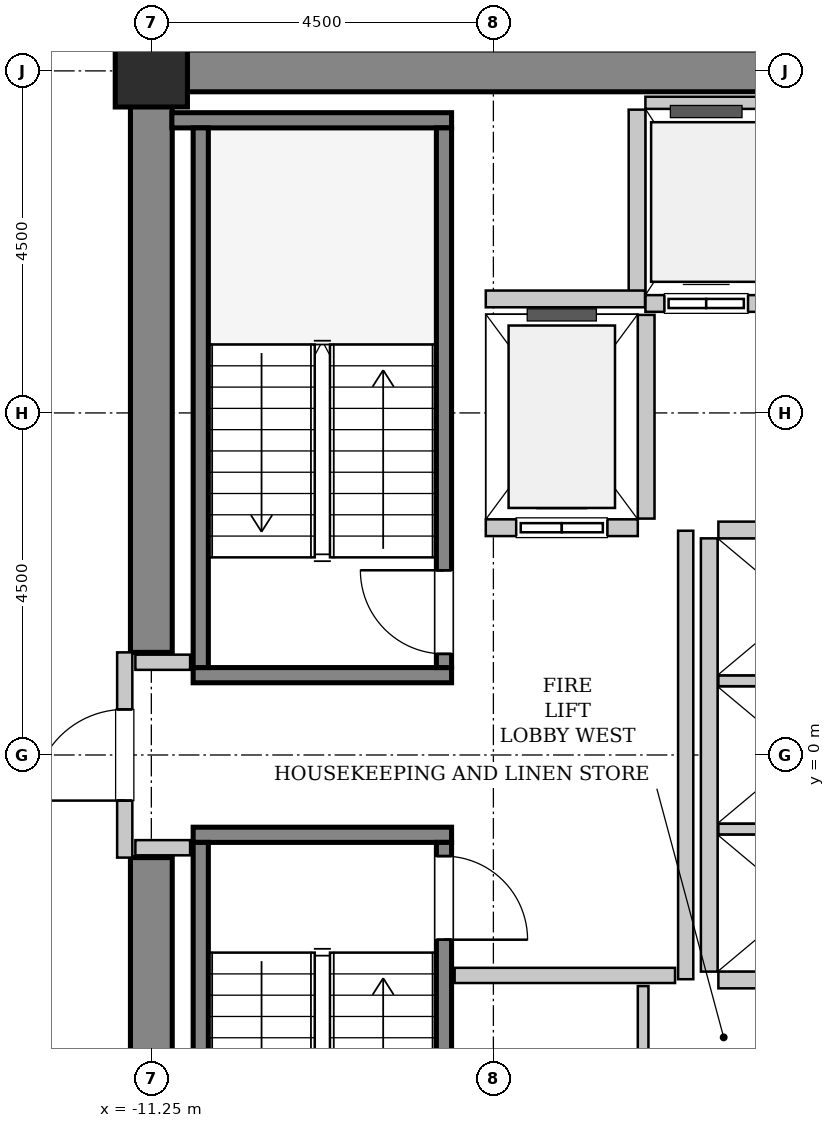
"""IFC4 building model, lengths in metres.
Left out: names, types, materials, properties, quantities, classifications, styles, units other than length and angle.
Written with IfcOpenShell. Run it as: python <this file> out.ifc"""

import sys

from ifc_helpers import new_model, si_unit, direction, frame, frame_2d, origin, origin_2d, place, context, subcontext, project, spatial, rectangle, hollow_rectangle, extrude, source, transform, mapped, element, fill, save


model = new_model("IFC4")
c1 = context("Model", 3, precision=1e-05, world=origin(), true_north=direction((0.0, 1.0)))
c2 = subcontext(c1, "Body", "Model", "MODEL_VIEW")
j1 = project(units=[si_unit("LENGTHUNIT", "METRE"), si_unit("PLANEANGLEUNIT", "RADIAN")], contexts=[c1])
p1 = place(None, origin())
s1 = spatial("IfcSite", under=j1, at=p1, CompositionType="ELEMENT")
p2 = place(p1, origin())
s2 = spatial("IfcBuilding", under=s1, at=p2, CompositionType="ELEMENT")
p3 = place(p2, frame((0.0, 0.0, 140.2)))
s3 = spatial("IfcBuildingStorey", under=s2, at=p3, CompositionType="ELEMENT", Elevation=140.2)
m1 = source(origin(), c2, "Body", "SweptSolid", [
    extrude(rectangle(XDim=9.975, YDim=0.55, at=frame_2d((4.987, 0.0))), origin(), (0.0, 0.0, 1.0), 3.8),
])
p4 = place(p3, frame((-11.525, 9.0, 0.0), z_axis=(0.0, 0.0, 1.0), x_axis=(1.0, 0.0, 0.0)))
e1 = element("IfcWall", 1, at=p4, inside=s3, PredefinedType="SHEAR", context=c2, shape_type="MappedRepresentation", body=[
    mapped(m1, transform((0.0, 0.0, 0.0), x_axis=(1.0, 0.0, 0.0), y_axis=(0.0, 1.0, 0.0), z_axis=(0.0, 0.0, 1.0), scale=1.0)),
])
m2 = source(origin(), c2, "Body", "SweptSolid", [
    extrude(rectangle(XDim=7.375, YDim=0.55, at=frame_2d((3.688, 0.0))), origin(), (0.0, 0.0, 1.0), 3.8),
])
for number, where, z_axis, x_axis in (
    (2, (-11.25, -8.725, 0.0), (0.0, 0.0, 1.0), (0.0, 1.0, 0.0)),
    (3, (-11.25, 1.35, 0.0), (0.0, 0.0, 1.0), (0.0, 1.0, 0.0)),
):
    element("IfcWall", number, at=place(p3, frame(where, z_axis=z_axis, x_axis=x_axis)), inside=s3, PredefinedType="SHEAR", context=c2, shape_type="MappedRepresentation", body=[
        mapped(m2, transform((0.0, 0.0, 0.0), x_axis=(1.0, 0.0, 0.0), y_axis=(0.0, 1.0, 0.0), z_axis=(0.0, 0.0, 1.0), scale=1.0)),
    ])
m3 = source(origin(), c2, "Body", "SweptSolid", [
    extrude(hollow_rectangle(XDim=0.95, YDim=0.95, WallThickness=0.045, InnerFilletRadius=0.045, OuterFilletRadius=0.09, at=origin_2d()), origin(), (0.0, 0.0, 1.0), 3.8),
])
p5 = place(p3, frame((-11.25, 9.0, 0.0), z_axis=(0.0, 0.0, 1.0), x_axis=(1.0, 0.0, 0.0)))
e4 = element("IfcColumn", 4, at=p5, inside=s3, PredefinedType="COLUMN", context=c2, shape_type="MappedRepresentation", body=[
    mapped(m3, transform((0.0, 0.0, 0.0), x_axis=(1.0, 0.0, 0.0), y_axis=(0.0, 1.0, 0.0), z_axis=(0.0, 0.0, 1.0), scale=1.0)),
])
m4 = source(origin(), c2, "Body", "SweptSolid", [
    extrude(rectangle(XDim=3.4, YDim=0.2, at=frame_2d((1.7, 0.0))), origin(), (0.0, 0.0, 1.0), 3.8),
])
p6 = place(p3, frame((-7.3, 1.05, 0.0), z_axis=(0.0, 0.0, 1.0), x_axis=(-1.0, 0.0, 0.0)))
e5 = element("IfcWall", 5, at=p6, inside=s3, PredefinedType="SOLIDWALL", context=c2, shape_type="MappedRepresentation", body=[
    mapped(m4, transform((0.0, 0.0, 0.0), x_axis=(1.0, 0.0, 0.0), y_axis=(0.0, 1.0, 0.0), z_axis=(0.0, 0.0, 1.0), scale=1.0)),
])
m5 = source(origin(), c2, "Body", "SweptSolid", [
    extrude(rectangle(XDim=3.68, YDim=0.2, at=frame_2d((1.84, 0.0))), origin(), (0.0, 0.0, 1.0), 3.8),
])
p7 = place(p3, frame((-7.3, 8.35, 0.0), z_axis=(0.0, 0.0, 1.0), x_axis=(-1.0, 0.0, 0.0)))
e6 = element("IfcWall", 6, at=p7, inside=s3, PredefinedType="SOLIDWALL", context=c2, shape_type="MappedRepresentation", body=[
    mapped(m5, transform((0.0, 0.0, 0.0), x_axis=(1.0, 0.0, 0.0), y_axis=(0.0, 1.0, 0.0), z_axis=(0.0, 0.0, 1.0), scale=1.0)),
])
m6 = source(origin(), c2, "Body", "SweptSolid", [
    extrude(rectangle(XDim=7.1, YDim=0.2, at=frame_2d((3.55, 0.0))), origin(), (0.0, 0.0, 1.0), 3.8),
])
p8 = place(p3, frame((-7.4, 1.15, 0.0), z_axis=(0.0, 0.0, 1.0), x_axis=(0.0, 1.0, 0.0)))
e7 = element("IfcWall", 7, at=p8, inside=s3, PredefinedType="SOLIDWALL", context=c2, shape_type="MappedRepresentation", body=[
    mapped(m6, transform((0.0, 0.0, 0.0), x_axis=(1.0, 0.0, 0.0), y_axis=(0.0, 1.0, 0.0), z_axis=(0.0, 0.0, 1.0), scale=1.0)),
])
p9 = place(p8, frame((0.18, 0.0, 0.0)))
e8 = element("IfcOpeningElement", 8, at=p9, cuts=e7, PredefinedType="OPENING", context=c2, shape_type="SweptSolid", body=[
    extrude(rectangle(XDim=1.1, YDim=2.15, at=frame_2d((0.55, 1.075))), frame((0.0, 0.11, 0.0), z_axis=(0.0, -1.0, 0.0), x_axis=(1.0, 0.0, 0.0)), (0.0, 0.0, 1.0), 0.22),
])
p10 = place(p3, frame((-10.6, 1.15, 0.0), z_axis=(0.0, 0.0, 1.0), x_axis=(0.0, 1.0, 0.0)))
e9 = element("IfcWall", 9, at=p10, inside=s3, PredefinedType="SOLIDWALL", context=c2, shape_type="MappedRepresentation", body=[
    mapped(m6, transform((0.0, 0.0, 0.0), x_axis=(1.0, 0.0, 0.0), y_axis=(0.0, 1.0, 0.0), z_axis=(0.0, 0.0, 1.0), scale=1.0)),
])
p11 = place(p3, frame((-10.7, -1.05, 0.0), z_axis=(0.0, 0.0, 1.0), x_axis=(1.0, 0.0, 0.0)))
e10 = element("IfcWall", 10, at=p11, inside=s3, PredefinedType="SOLIDWALL", context=c2, shape_type="MappedRepresentation", body=[
    mapped(m4, transform((0.0, 0.0, 0.0), x_axis=(1.0, 0.0, 0.0), y_axis=(0.0, 1.0, 0.0), z_axis=(0.0, 0.0, 1.0), scale=1.0)),
])
p12 = place(p3, frame((-10.6, -1.15, 0.0), z_axis=(0.0, 0.0, 1.0), x_axis=(0.0, -1.0, 0.0)))
e11 = element("IfcWall", 11, at=p12, inside=s3, PredefinedType="SOLIDWALL", context=c2, shape_type="MappedRepresentation", body=[
    mapped(m6, transform((0.0, 0.0, 0.0), x_axis=(1.0, 0.0, 0.0), y_axis=(0.0, 1.0, 0.0), z_axis=(0.0, 0.0, 1.0), scale=1.0)),
])
p13 = place(p3, frame((-7.4, -1.15, 0.0), z_axis=(0.0, 0.0, 1.0), x_axis=(0.0, -1.0, 0.0)))
e12 = element("IfcWall", 12, at=p13, inside=s3, PredefinedType="SOLIDWALL", context=c2, shape_type="MappedRepresentation", body=[
    mapped(m6, transform((0.0, 0.0, 0.0), x_axis=(1.0, 0.0, 0.0), y_axis=(0.0, 1.0, 0.0), z_axis=(0.0, 0.0, 1.0), scale=1.0)),
])
p14 = place(p13, frame((0.18, 0.0, 0.0)))
e13 = element("IfcOpeningElement", 13, at=p14, cuts=e12, PredefinedType="OPENING", context=c2, shape_type="SweptSolid", body=[
    extrude(rectangle(XDim=1.1, YDim=2.15, at=frame_2d((0.55, 1.075))), frame((0.0, 0.11, 0.0), z_axis=(0.0, -1.0, 0.0), x_axis=(1.0, 0.0, 0.0)), (0.0, 0.0, 1.0), 0.22),
])
m7 = source(origin(), c2, "Body", "SweptSolid", [
    extrude(rectangle(XDim=2.0, YDim=0.22, at=frame_2d((1.0, 0.0))), origin(), (0.0, 0.0, 1.0), 3.485),
])
p15 = place(p3, frame((-6.85, 2.99, 0.0), z_axis=(0.0, 0.0, 1.0), x_axis=(1.0, 0.0, 0.0)))
e14 = element("IfcWall", 14, at=p15, inside=s3, PredefinedType="SOLIDWALL", context=c2, shape_type="MappedRepresentation", body=[
    mapped(m7, transform((0.0, 0.0, 0.0), x_axis=(1.0, 0.0, 0.0), y_axis=(0.0, 1.0, 0.0), z_axis=(0.0, 0.0, 1.0), scale=1.0)),
])
p16 = place(p15, frame((0.4, 0.0, 0.0)))
e15 = element("IfcOpeningElement", 15, at=p16, cuts=e14, PredefinedType="OPENING", context=c2, shape_type="SweptSolid", body=[
    extrude(rectangle(XDim=1.2, YDim=2.2, at=frame_2d((0.6, 1.1))), frame((0.0, 0.12, 0.0), z_axis=(0.0, -1.0, 0.0), x_axis=(1.0, 0.0, 0.0)), (0.0, 0.0, 1.0), 0.24),
])
m8 = source(origin(), c2, "Body", "SweptSolid", [
    extrude(rectangle(XDim=2.68, YDim=0.22, at=frame_2d((1.34, 0.0))), origin(), (0.0, 0.0, 1.0), 3.485),
])
p17 = place(p3, frame((-4.74, 3.11, 0.0), z_axis=(0.0, 0.0, 1.0), x_axis=(0.0, 1.0, 0.0)))
e16 = element("IfcWall", 16, at=p17, inside=s3, PredefinedType="SOLIDWALL", context=c2, shape_type="MappedRepresentation", body=[
    mapped(m8, transform((0.0, 0.0, 0.0), x_axis=(1.0, 0.0, 0.0), y_axis=(0.0, 1.0, 0.0), z_axis=(0.0, 0.0, 1.0), scale=1.0)),
])
m9 = source(origin(), c2, "Body", "SweptSolid", [
    extrude(rectangle(XDim=3.2, YDim=0.22, at=frame_2d((1.6, 0.0))), origin(), (0.0, 0.0, 1.0), 3.485),
])
p18 = place(p3, frame((-4.75, 5.94, 0.0), z_axis=(0.0, 0.0, 1.0), x_axis=(1.0, 0.0, 0.0)))
e17 = element("IfcWall", 17, at=p18, inside=s3, PredefinedType="SOLIDWALL", context=c2, shape_type="MappedRepresentation", body=[
    mapped(m9, transform((0.0, 0.0, 0.0), x_axis=(1.0, 0.0, 0.0), y_axis=(0.0, 1.0, 0.0), z_axis=(0.0, 0.0, 1.0), scale=1.0)),
])
p19 = place(p18, frame((0.25, 0.0, 0.0)))
e18 = element("IfcOpeningElement", 18, at=p19, cuts=e17, PredefinedType="OPENING", context=c2, shape_type="SweptSolid", body=[
    extrude(rectangle(XDim=1.1, YDim=2.2, at=frame_2d((0.55, 1.1))), frame((0.0, 0.12, 0.0), z_axis=(0.0, -1.0, 0.0), x_axis=(1.0, 0.0, 0.0)), (0.0, 0.0, 1.0), 0.24),
])
p20 = place(p18, frame((1.875, 0.0, 0.0)))
e19 = element("IfcOpeningElement", 19, at=p20, cuts=e17, PredefinedType="OPENING", context=c2, shape_type="SweptSolid", body=[
    extrude(rectangle(XDim=1.1, YDim=2.2, at=frame_2d((0.55, 1.1))), frame((0.0, 0.12, 0.0), z_axis=(0.0, -1.0, 0.0), x_axis=(1.0, 0.0, 0.0)), (0.0, 0.0, 1.0), 0.24),
])
m10 = source(origin(), c2, "Body", "SweptSolid", [
    extrude(rectangle(XDim=3.2, YDim=0.16, at=frame_2d((1.6, 0.0))), origin(), (0.0, 0.0, 1.0), 2.375),
])
p21 = place(p3, frame((-1.55, 8.58, 0.0), z_axis=(0.0, 0.0, 1.0), x_axis=(-1.0, 0.0, 0.0)))
e20 = element("IfcWall", 20, at=p21, inside=s3, PredefinedType="PARTITIONING", context=c2, shape_type="MappedRepresentation", body=[
    mapped(m10, transform((0.0, 0.0, 0.0), x_axis=(1.0, 0.0, 0.0), y_axis=(0.0, 1.0, 0.0), z_axis=(0.0, 0.0, 1.0), scale=1.0)),
])
m11 = source(origin(), c2, "Body", "SweptSolid", [
    extrude(rectangle(XDim=2.43, YDim=0.22, at=frame_2d((1.215, 0.0))), origin(), (0.0, 0.0, 1.0), 3.485),
])
p22 = place(p3, frame((-4.86, 8.49, 0.0), z_axis=(0.0, 0.0, 1.0), x_axis=(0.0, -1.0, 0.0)))
e21 = element("IfcWall", 21, at=p22, inside=s3, PredefinedType="SOLIDWALL", context=c2, shape_type="MappedRepresentation", body=[
    mapped(m11, transform((0.0, 0.0, 0.0), x_axis=(1.0, 0.0, 0.0), y_axis=(0.0, 1.0, 0.0), z_axis=(0.0, 0.0, 1.0), scale=1.0)),
])
m12 = source(origin(), c2, "Body", "SweptSolid", [
    extrude(rectangle(XDim=5.7, YDim=0.22, at=frame_2d((2.85, 0.0))), origin(), (0.0, 0.0, 1.0), 3.485),
])
p23 = place(p3, frame((-3.91, 2.85, 0.0), z_axis=(0.0, 0.0, 1.0), x_axis=(0.0, -1.0, 0.0)))
e22 = element("IfcWall", 22, at=p23, inside=s3, PredefinedType="SOLIDWALL", context=c2, shape_type="MappedRepresentation", body=[
    mapped(m12, transform((0.0, 0.0, 0.0), x_axis=(1.0, 0.0, 0.0), y_axis=(0.0, 1.0, 0.0), z_axis=(0.0, 0.0, 1.0), scale=1.0)),
])
m13 = source(origin(), c2, "Body", "SweptSolid", [
    extrude(rectangle(XDim=2.13, YDim=0.22, at=frame_2d((1.065, 0.0))), origin(), (0.0, 0.0, 1.0), 3.485),
])
p24 = place(p3, frame((-3.79, -2.96, 0.0), z_axis=(0.0, 0.0, 1.0), x_axis=(1.0, 0.0, 0.0)))
e23 = element("IfcWall", 23, at=p24, inside=s3, PredefinedType="SOLIDWALL", context=c2, shape_type="MappedRepresentation", body=[
    mapped(m13, transform((0.0, 0.0, 0.0), x_axis=(1.0, 0.0, 0.0), y_axis=(0.0, 1.0, 0.0), z_axis=(0.0, 0.0, 1.0), scale=1.0)),
])
m14 = source(origin(), c2, "Body", "SweptSolid", [
    extrude(rectangle(XDim=2.13, YDim=0.14, at=frame_2d((1.065, 0.0))), origin(), (0.0, 0.0, 1.0), 3.485),
])
for number, where, z_axis, x_axis in (
    (24, (-3.79, -0.975, 0.0), (0.0, 0.0, 1.0), (1.0, 0.0, 0.0)),
    (25, (-3.79, 0.975, 0.0), (0.0, 0.0, 1.0), (1.0, 0.0, 0.0)),
):
    element("IfcWall", number, at=place(p3, frame(where, z_axis=z_axis, x_axis=x_axis)), inside=s3, PredefinedType="PARTITIONING", context=c2, shape_type="MappedRepresentation", body=[
        mapped(m14, transform((0.0, 0.0, 0.0), x_axis=(1.0, 0.0, 0.0), y_axis=(0.0, 1.0, 0.0), z_axis=(0.0, 0.0, 1.0), scale=1.0)),
    ])
p25 = place(p3, frame((-1.66, 2.96, 0.0), z_axis=(0.0, 0.0, 1.0), x_axis=(-1.0, 0.0, 0.0)))
e26 = element("IfcWall", 26, at=p25, inside=s3, PredefinedType="SOLIDWALL", context=c2, shape_type="MappedRepresentation", body=[
    mapped(m13, transform((0.0, 0.0, 0.0), x_axis=(1.0, 0.0, 0.0), y_axis=(0.0, 1.0, 0.0), z_axis=(0.0, 0.0, 1.0), scale=1.0)),
])
m15 = source(origin(), c2, "Body", "SweptSolid", [
    extrude(rectangle(XDim=2.095, YDim=0.22, at=frame_2d((1.048, 0.0))), origin(), (0.0, 0.0, 1.0), 3.485),
])
p26 = place(p3, frame((-6.85, 6.0, 0.0), z_axis=(0.0, 0.0, 1.0), x_axis=(1.0, 0.0, 0.0)))
e27 = element("IfcWall", 27, at=p26, inside=s3, PredefinedType="SOLIDWALL", context=c2, shape_type="MappedRepresentation", body=[
    mapped(m15, transform((0.0, 0.0, 0.0), x_axis=(1.0, 0.0, 0.0), y_axis=(0.0, 1.0, 0.0), z_axis=(0.0, 0.0, 1.0), scale=1.0)),
])
m16 = source(origin(), c2, "Body", "SweptSolid", [
    extrude(rectangle(XDim=2.7, YDim=0.2, at=frame_2d((1.35, 0.0))), origin(), (0.0, 0.0, 1.0), 2.375),
])
p27 = place(p3, frame((-11.6, -1.35, 0.0), z_axis=(0.0, 0.0, 1.0), x_axis=(0.0, 1.0, 0.0)))
e28 = element("IfcWall", 28, at=p27, inside=s3, PredefinedType="PARTITIONING", context=c2, shape_type="MappedRepresentation", body=[
    mapped(m16, transform((0.0, 0.0, 0.0), x_axis=(1.0, 0.0, 0.0), y_axis=(0.0, 1.0, 0.0), z_axis=(0.0, 0.0, 1.0), scale=1.0)),
])
p28 = place(p27, frame((0.75, 0.0, 0.0)))
e29 = element("IfcOpeningElement", 29, at=p28, cuts=e28, PredefinedType="OPENING", context=c2, shape_type="SweptSolid", body=[
    extrude(rectangle(XDim=1.2, YDim=2.15, at=frame_2d((0.6, 1.075))), frame((0.0, 0.11, 0.0), z_axis=(0.0, -1.0, 0.0), x_axis=(1.0, 0.0, 0.0)), (0.0, 0.0, 1.0), 0.22),
])
m17 = source(origin(), c2, "Body", "SweptSolid", [
    extrude(rectangle(XDim=5.9, YDim=0.2, at=frame_2d((2.95, 0.0))), origin(), (0.0, 0.0, 1.0), 3.485),
])
p29 = place(p3, frame((-4.22, -2.95, 0.0), z_axis=(0.0, 0.0, 1.0), x_axis=(0.0, 1.0, 0.0)))
e30 = element("IfcWall", 30, at=p29, inside=s3, PredefinedType="PARTITIONING", context=c2, shape_type="MappedRepresentation", body=[
    mapped(m17, transform((0.0, 0.0, 0.0), x_axis=(1.0, 0.0, 0.0), y_axis=(0.0, 1.0, 0.0), z_axis=(0.0, 0.0, 1.0), scale=1.0)),
])
m18 = source(origin(), c2, "Body", "SweptSolid", [
    extrude(rectangle(XDim=2.9, YDim=0.2, at=frame_2d((1.45, 0.0))), origin(), (0.0, 0.0, 1.0), 3.485),
])
p30 = place(p3, frame((-7.26, -2.9, 0.0), z_axis=(0.0, 0.0, 1.0), x_axis=(1.0, 0.0, 0.0)))
e31 = element("IfcWall", 31, at=p30, inside=s3, PredefinedType="PARTITIONING", context=c2, shape_type="MappedRepresentation", body=[
    mapped(m18, transform((0.0, 0.0, 0.0), x_axis=(1.0, 0.0, 0.0), y_axis=(0.0, 1.0, 0.0), z_axis=(0.0, 0.0, 1.0), scale=1.0)),
])
m19 = source(origin(), c2, "Body", "SweptSolid", [
    extrude(rectangle(XDim=0.72, YDim=0.2, at=frame_2d((0.36, 0.0))), origin(), (0.0, 0.0, 1.0), 3.485),
])
for number, where, z_axis, x_axis in (
    (32, (-11.46, 1.22, 0.0), (0.0, 0.0, 1.0), (1.0, 0.0, 0.0)),
    (33, (-11.46, -1.22, 0.0), (0.0, 0.0, 1.0), (1.0, 0.0, 0.0)),
):
    element("IfcWall", number, at=place(p3, frame(where, z_axis=z_axis, x_axis=x_axis)), inside=s3, PredefinedType="PARTITIONING", context=c2, shape_type="MappedRepresentation", body=[
        mapped(m19, transform((0.0, 0.0, 0.0), x_axis=(1.0, 0.0, 0.0), y_axis=(0.0, 1.0, 0.0), z_axis=(0.0, 0.0, 1.0), scale=1.0)),
    ])
m20 = source(origin(), c2, "Body", "SweptSolid", [
    extrude(rectangle(XDim=1.26, YDim=0.14, at=frame_2d((0.63, 0.0))), origin(), (0.0, 0.0, 1.0), 3.485),
])
p31 = place(p3, frame((-4.78, -4.3, 0.0), z_axis=(0.0, 0.0, 1.0), x_axis=(0.0, 1.0, 0.0)))
e34 = element("IfcWall", 34, at=p31, inside=s3, PredefinedType="PARTITIONING", context=c2, shape_type="MappedRepresentation", body=[
    mapped(m20, transform((0.0, 0.0, 0.0), x_axis=(1.0, 0.0, 0.0), y_axis=(0.0, 1.0, 0.0), z_axis=(0.0, 0.0, 1.0), scale=1.0)),
])
m21 = source(origin(), c2, "Body", "SweptSolid", [
    extrude(rectangle(XDim=1.1, YDim=2.15, at=frame_2d((0.55, 1.075))), frame((0.0, 0.025, 0.0), z_axis=(0.0, -1.0, 0.0), x_axis=(1.0, 0.0, 0.0)), (0.0, 0.0, 1.0), 0.05),
])
p32 = place(p9, origin())
e35 = element("IfcDoor", 35, at=p32, inside=s3, OperationType="SINGLE_SWING_RIGHT", PredefinedType="DOOR", context=c2, shape_type="MappedRepresentation", body=[
    mapped(m21, transform((0.0, 0.0, 0.0), x_axis=(1.0, 0.0, 0.0), y_axis=(0.0, 1.0, 0.0), z_axis=(0.0, 0.0, 1.0), scale=1.0)),
])
fill(e8, e35)
p33 = place(p14, origin())
e36 = element("IfcDoor", 36, at=p33, inside=s3, OperationType="SINGLE_SWING_RIGHT", PredefinedType="DOOR", context=c2, shape_type="MappedRepresentation", body=[
    mapped(m21, transform((0.0, 0.0, 0.0), x_axis=(1.0, 0.0, 0.0), y_axis=(0.0, 1.0, 0.0), z_axis=(0.0, 0.0, 1.0), scale=1.0)),
])
fill(e13, e36)
m22 = source(origin(), c2, "Body", "SweptSolid", [
    extrude(rectangle(XDim=1.2, YDim=2.2, at=frame_2d((0.6, 1.1))), frame((0.0, 0.025, 0.0), z_axis=(0.0, -1.0, 0.0), x_axis=(1.0, 0.0, 0.0)), (0.0, 0.0, 1.0), 0.05),
])
p34 = place(p16, origin())
e37 = element("IfcDoor", 37, at=p34, inside=s3, OperationType="SLIDING_TO_LEFT", PredefinedType="DOOR", context=c2, shape_type="MappedRepresentation", body=[
    mapped(m22, transform((0.0, 0.0, 0.0), x_axis=(1.0, 0.0, 0.0), y_axis=(0.0, 1.0, 0.0), z_axis=(0.0, 0.0, 1.0), scale=1.0)),
])
fill(e15, e37)
m23 = source(origin(), c2, "Body", "SweptSolid", [
    extrude(rectangle(XDim=1.1, YDim=2.2, at=frame_2d((0.55, 1.1))), frame((0.0, 0.025, 0.0), z_axis=(0.0, -1.0, 0.0), x_axis=(1.0, 0.0, 0.0)), (0.0, 0.0, 1.0), 0.05),
])
p35 = place(p19, origin())
e38 = element("IfcDoor", 38, at=p35, inside=s3, OperationType="DOUBLE_DOOR_SLIDING", PredefinedType="DOOR", context=c2, shape_type="MappedRepresentation", body=[
    mapped(m23, transform((0.0, 0.0, 0.0), x_axis=(1.0, 0.0, 0.0), y_axis=(0.0, 1.0, 0.0), z_axis=(0.0, 0.0, 1.0), scale=1.0)),
])
fill(e18, e38)
m24 = source(origin(), c2, "Body", "SweptSolid", [
    extrude(rectangle(XDim=1.2, YDim=2.15, at=frame_2d((0.6, 1.075))), frame((0.0, 0.025, 0.0), z_axis=(0.0, -1.0, 0.0), x_axis=(1.0, 0.0, 0.0)), (0.0, 0.0, 1.0), 0.05),
])
p36 = place(p28, origin())
e39 = element("IfcDoor", 39, at=p36, inside=s3, OperationType="SINGLE_SWING_LEFT", PredefinedType="DOOR", context=c2, shape_type="MappedRepresentation", body=[
    mapped(m24, transform((0.0, 0.0, 0.0), x_axis=(1.0, 0.0, 0.0), y_axis=(0.0, 1.0, 0.0), z_axis=(0.0, 0.0, 1.0), scale=1.0)),
])
fill(e29, e39)
save(model, sys.argv[1])
